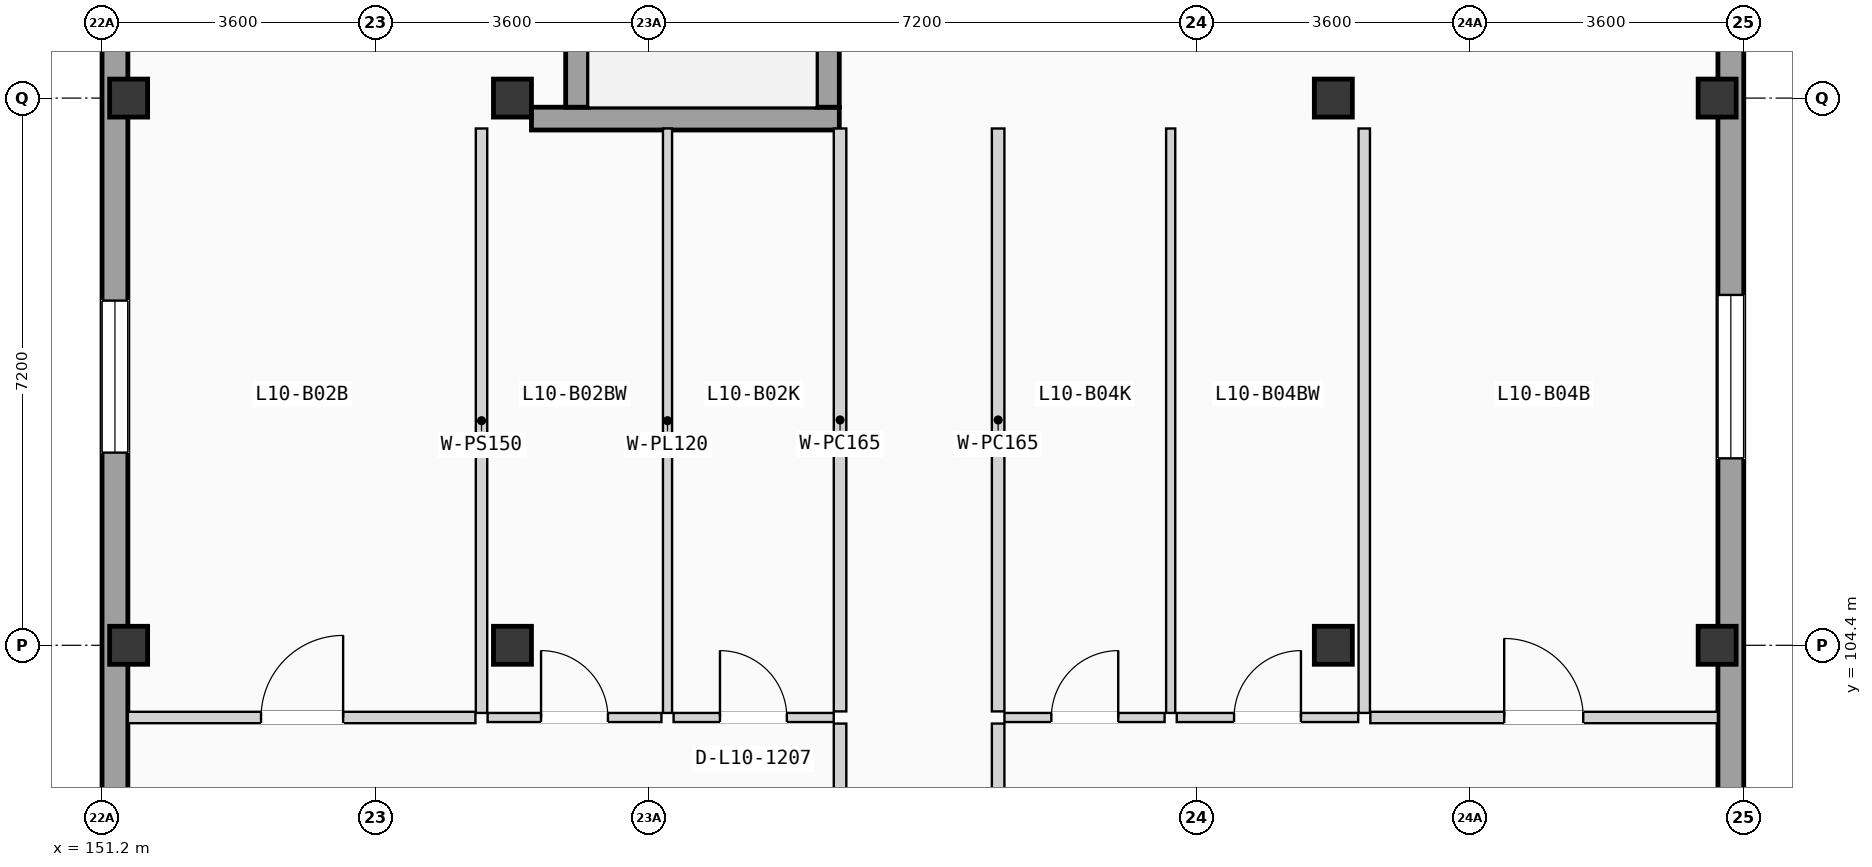
"""IFC4 building model, lengths in metres.
Left out: names, types, materials, properties, quantities, classifications, styles, units other than length and angle.
Written with IfcOpenShell. Run it as: python <this file> out.ifc"""

import sys

from ifc_helpers import new_model, si_unit, direction, frame, frame_2d, origin, origin_2d, place, context, subcontext, project, spatial, rectangle, extrude, element, fill, save


model = new_model("IFC4")
c1 = context("Model", 3, precision=1e-05, world=origin(), true_north=direction((0.0, 1.0)))
c2 = subcontext(c1, "Body", "Model", "MODEL_VIEW")
j1 = project(units=[si_unit("LENGTHUNIT", "METRE"), si_unit("PLANEANGLEUNIT", "RADIAN")], contexts=[c1])
p1 = place(None, origin())
s1 = spatial("IfcSite", under=j1, at=p1, CompositionType="ELEMENT")
p2 = place(p1, origin())
s2 = spatial("IfcBuilding", under=s1, at=p2, CompositionType="ELEMENT")
p3 = place(p2, frame((0.0, 0.0, 34.125)))
s3 = spatial("IfcBuildingStorey", under=s2, at=p3, CompositionType="ELEMENT", Elevation=34.125)
for number, where, z_axis, x_axis in (
    (1, (151.55, 104.4, 0.0), (0.0, 0.0, 1.0), (1.0, 0.0, 0.0)),
    (2, (151.55, 111.6, 0.0), (0.0, 0.0, 1.0), (1.0, 0.0, 0.0)),
    (3, (156.6, 104.4, 0.0), (0.0, 0.0, 1.0), (1.0, 0.0, 0.0)),
    (4, (156.6, 111.6, 0.0), (0.0, 0.0, 1.0), (1.0, 0.0, 0.0)),
    (5, (167.4, 104.4, 0.0), (0.0, 0.0, 1.0), (1.0, 0.0, 0.0)),
    (6, (167.4, 111.6, 0.0), (0.0, 0.0, 1.0), (1.0, 0.0, 0.0)),
    (7, (172.45, 104.4, 0.0), (0.0, 0.0, 1.0), (1.0, 0.0, 0.0)),
    (8, (172.45, 111.6, 0.0), (0.0, 0.0, 1.0), (1.0, 0.0, 0.0)),
):
    element("IfcColumn", number, at=place(p3, frame(where, z_axis=z_axis, x_axis=x_axis)), inside=s3, PredefinedType="COLUMN", context=c2, shape_type="SweptSolid", body=[
        extrude(rectangle(XDim=0.5, YDim=0.5, at=origin_2d()), origin(), (0.0, 0.0, 1.0), 3.15),
    ])
p4 = place(p3, frame((151.37, 68.74, 0.0), z_axis=(0.0, 0.0, 1.0), x_axis=(0.0, 1.0, 0.0)))
e9 = element("IfcWall", 9, at=p4, inside=s3, PredefinedType="SOLIDWALL", context=c2, shape_type="SweptSolid", body=[
    extrude(rectangle(XDim=49.72, YDim=0.34, at=frame_2d((24.86, 0.0))), origin(), (0.0, 0.0, 1.0), 2.89),
])
p5 = place(p4, frame((14.9, 0.0, 0.9)))
e10 = element("IfcOpeningElement", 10, at=p5, cuts=e9, PredefinedType="OPENING", context=c2, shape_type="SweptSolid", body=[
    extrude(rectangle(XDim=1.85, YDim=1.2, at=frame_2d((0.925, 0.6))), frame((0.0, 0.18, 0.0), z_axis=(0.0, -1.0, 0.0), x_axis=(1.0, 0.0, 0.0)), (0.0, 0.0, 1.0), 0.36),
])
p6 = place(p4, frame((8.573, 0.0, 0.855)))
e11 = element("IfcOpeningElement", 11, at=p6, cuts=e9, PredefinedType="OPENING", context=c2, shape_type="SweptSolid", body=[
    extrude(rectangle(XDim=1.85, YDim=1.35, at=frame_2d((0.925, 0.675))), frame((0.0, 0.18, 0.0), z_axis=(0.0, -1.0, 0.0), x_axis=(1.0, 0.0, 0.0)), (0.0, 0.0, 1.0), 0.36),
])
p7 = place(p4, frame((18.31, 0.0, 0.705)))
e12 = element("IfcOpeningElement", 12, at=p7, cuts=e9, PredefinedType="OPENING", context=c2, shape_type="SweptSolid", body=[
    extrude(rectangle(XDim=1.85, YDim=1.5, at=frame_2d((0.925, 0.75))), frame((0.0, 0.18, 0.0), z_axis=(0.0, -1.0, 0.0), x_axis=(1.0, 0.0, 0.0)), (0.0, 0.0, 1.0), 0.36),
])
p8 = place(p4, frame((31.135, 0.0, 0.555)))
e13 = element("IfcOpeningElement", 13, at=p8, cuts=e9, PredefinedType="OPENING", context=c2, shape_type="SweptSolid", body=[
    extrude(rectangle(XDim=1.85, YDim=1.65, at=frame_2d((0.925, 0.825))), frame((0.0, 0.18, 0.0), z_axis=(0.0, -1.0, 0.0), x_axis=(1.0, 0.0, 0.0)), (0.0, 0.0, 1.0), 0.36),
])
p9 = place(p4, frame((24.687, 0.0, 0.85)))
e14 = element("IfcOpeningElement", 14, at=p9, cuts=e9, PredefinedType="OPENING", context=c2, shape_type="SweptSolid", body=[
    extrude(rectangle(XDim=0.95, YDim=1.2, at=frame_2d((0.475, 0.6))), frame((0.0, 0.18, 0.0), z_axis=(0.0, -1.0, 0.0), x_axis=(1.0, 0.0, 0.0)), (0.0, 0.0, 1.0), 0.36),
])
p10 = place(p4, frame((38.195, 0.0, 0.9)))
e15 = element("IfcOpeningElement", 15, at=p10, cuts=e9, PredefinedType="OPENING", context=c2, shape_type="SweptSolid", body=[
    extrude(rectangle(XDim=2.0, YDim=1.2, at=frame_2d((1.0, 0.6))), frame((0.0, 0.18, 0.0), z_axis=(0.0, -1.0, 0.0), x_axis=(1.0, 0.0, 0.0)), (0.0, 0.0, 1.0), 0.36),
])
p11 = place(p3, frame((172.63, 68.74, 0.0), z_axis=(0.0, 0.0, 1.0), x_axis=(0.0, 1.0, 0.0)))
e16 = element("IfcWall", 16, at=p11, inside=s3, PredefinedType="SOLIDWALL", context=c2, shape_type="SweptSolid", body=[
    extrude(rectangle(XDim=49.72, YDim=0.34, at=frame_2d((24.86, 0.0))), origin(), (0.0, 0.0, 1.0), 2.89),
])
p12 = place(p11, frame((14.825, 0.0, 0.855)))
e17 = element("IfcOpeningElement", 17, at=p12, cuts=e16, PredefinedType="OPENING", context=c2, shape_type="SweptSolid", body=[
    extrude(rectangle(XDim=2.0, YDim=1.35, at=frame_2d((1.0, 0.675))), frame((0.0, 0.18, 0.0), z_axis=(0.0, -1.0, 0.0), x_axis=(1.0, 0.0, 0.0)), (0.0, 0.0, 1.0), 0.36),
])
p13 = place(p11, frame((8.498, 0.0, 0.705)))
e18 = element("IfcOpeningElement", 18, at=p13, cuts=e16, PredefinedType="OPENING", context=c2, shape_type="SweptSolid", body=[
    extrude(rectangle(XDim=2.0, YDim=1.5, at=frame_2d((1.0, 0.75))), frame((0.0, 0.18, 0.0), z_axis=(0.0, -1.0, 0.0), x_axis=(1.0, 0.0, 0.0)), (0.0, 0.0, 1.0), 0.36),
])
p14 = place(p11, frame((18.235, 0.0, 0.555)))
e19 = element("IfcOpeningElement", 19, at=p14, cuts=e16, PredefinedType="OPENING", context=c2, shape_type="SweptSolid", body=[
    extrude(rectangle(XDim=2.0, YDim=1.65, at=frame_2d((1.0, 0.825))), frame((0.0, 0.18, 0.0), z_axis=(0.0, -1.0, 0.0), x_axis=(1.0, 0.0, 0.0)), (0.0, 0.0, 1.0), 0.36),
])
p15 = place(p11, frame((31.585, 0.0, 0.85)))
e20 = element("IfcOpeningElement", 20, at=p15, cuts=e16, PredefinedType="OPENING", context=c2, shape_type="SweptSolid", body=[
    extrude(rectangle(XDim=0.95, YDim=1.2, at=frame_2d((0.475, 0.6))), frame((0.0, 0.18, 0.0), z_axis=(0.0, -1.0, 0.0), x_axis=(1.0, 0.0, 0.0)), (0.0, 0.0, 1.0), 0.36),
])
p16 = place(p11, frame((24.087, 0.0, 0.9)))
e21 = element("IfcOpeningElement", 21, at=p16, cuts=e16, PredefinedType="OPENING", context=c2, shape_type="SweptSolid", body=[
    extrude(rectangle(XDim=2.15, YDim=1.2, at=frame_2d((1.075, 0.6))), frame((0.0, 0.18, 0.0), z_axis=(0.0, -1.0, 0.0), x_axis=(1.0, 0.0, 0.0)), (0.0, 0.0, 1.0), 0.36),
])
p17 = place(p11, frame((38.12, 0.0, 0.855)))
e22 = element("IfcOpeningElement", 22, at=p17, cuts=e16, PredefinedType="OPENING", context=c2, shape_type="SweptSolid", body=[
    extrude(rectangle(XDim=2.15, YDim=1.35, at=frame_2d((1.075, 0.675))), frame((0.0, 0.18, 0.0), z_axis=(0.0, -1.0, 0.0), x_axis=(1.0, 0.0, 0.0)), (0.0, 0.0, 1.0), 0.36),
])
p18 = place(p3, frame((156.85, 111.33, 0.0), z_axis=(0.0, 0.0, 1.0), x_axis=(1.0, 0.0, 0.0)))
e23 = element("IfcWall", 23, at=p18, inside=s3, PredefinedType="SHEAR", context=c2, shape_type="SweptSolid", body=[
    extrude(rectangle(XDim=4.05, YDim=0.3, at=frame_2d((2.025, 0.0))), origin(), (0.0, 0.0, 1.0), 2.89),
])
p19 = place(p3, frame((157.45, 111.48, 0.0), z_axis=(0.0, 0.0, 1.0), x_axis=(0.0, 1.0, 0.0)))
e24 = element("IfcWall", 24, at=p19, inside=s3, PredefinedType="SHEAR", context=c2, shape_type="SweptSolid", body=[
    extrude(rectangle(XDim=7.0, YDim=0.3, at=frame_2d((3.5, 0.0))), origin(), (0.0, 0.0, 1.0), 2.89),
])
p20 = place(p3, frame((160.75, 111.48, 0.0), z_axis=(0.0, 0.0, 1.0), x_axis=(0.0, 1.0, 0.0)))
e25 = element("IfcWall", 25, at=p20, inside=s3, PredefinedType="SHEAR", context=c2, shape_type="SweptSolid", body=[
    extrude(rectangle(XDim=7.0, YDim=0.3, at=frame_2d((3.5, 0.0))), origin(), (0.0, 0.0, 1.0), 2.89),
])
p21 = place(p20, frame((5.625, 0.0, 0.0)))
e26 = element("IfcOpeningElement", 26, at=p21, cuts=e25, PredefinedType="OPENING", context=c2, shape_type="SweptSolid", body=[
    extrude(rectangle(XDim=1.15, YDim=2.12, at=frame_2d((0.575, 1.06))), frame((0.0, 0.16, 0.0), z_axis=(0.0, -1.0, 0.0), x_axis=(1.0, 0.0, 0.0)), (0.0, 0.0, 1.0), 0.32),
])
p22 = place(p3, frame((160.91, 98.23, 0.0), z_axis=(0.0, 0.0, 1.0), x_axis=(0.0, 1.0, 0.0)))
e27 = element("IfcWall", 27, at=p22, inside=s3, PredefinedType="PARTITIONING", context=c2, shape_type="SweptSolid", body=[
    extrude(rectangle(XDim=5.14, YDim=0.165, at=frame_2d((2.57, 0.0))), origin(), (0.0, 0.0, 1.0), 2.87),
])
p23 = place(p22, frame((2.065, 0.0, 0.0)))
e28 = element("IfcOpeningElement", 28, at=p23, cuts=e27, PredefinedType="OPENING", context=c2, shape_type="SweptSolid", body=[
    extrude(rectangle(XDim=1.01, YDim=2.11, at=frame_2d((0.505, 1.055))), frame((0.0, 0.093, 0.0), z_axis=(0.0, -1.0, 0.0), x_axis=(1.0, 0.0, 0.0)), (0.0, 0.0, 1.0), 0.185),
])
p24 = place(p3, frame((160.91, 103.53, 0.0), z_axis=(0.0, 0.0, 1.0), x_axis=(0.0, 1.0, 0.0)))
e29 = element("IfcWall", 29, at=p24, inside=s3, PredefinedType="PARTITIONING", context=c2, shape_type="SweptSolid", body=[
    extrude(rectangle(XDim=7.67, YDim=0.165, at=frame_2d((3.835, 0.0))), origin(), (0.0, 0.0, 1.0), 2.87),
])
p25 = place(p3, frame((162.99, 98.23, 0.0), z_axis=(0.0, 0.0, 1.0), x_axis=(0.0, 1.0, 0.0)))
e30 = element("IfcWall", 30, at=p25, inside=s3, PredefinedType="PARTITIONING", context=c2, shape_type="SweptSolid", body=[
    extrude(rectangle(XDim=5.14, YDim=0.165, at=frame_2d((2.57, 0.0))), origin(), (0.0, 0.0, 1.0), 2.87),
])
p26 = place(p25, frame((2.065, 0.0, 0.0)))
e31 = element("IfcOpeningElement", 31, at=p26, cuts=e30, PredefinedType="OPENING", context=c2, shape_type="SweptSolid", body=[
    extrude(rectangle(XDim=1.01, YDim=2.11, at=frame_2d((0.505, 1.055))), frame((0.0, 0.093, 0.0), z_axis=(0.0, -1.0, 0.0), x_axis=(1.0, 0.0, 0.0)), (0.0, 0.0, 1.0), 0.185),
])
p27 = place(p3, frame((162.99, 103.53, 0.0), z_axis=(0.0, 0.0, 1.0), x_axis=(0.0, 1.0, 0.0)))
e32 = element("IfcWall", 32, at=p27, inside=s3, PredefinedType="PARTITIONING", context=c2, shape_type="SweptSolid", body=[
    extrude(rectangle(XDim=7.67, YDim=0.165, at=frame_2d((3.835, 0.0))), origin(), (0.0, 0.0, 1.0), 2.87),
])
p28 = place(p3, frame((158.72, 103.45, 0.0), z_axis=(0.0, 0.0, 1.0), x_axis=(1.0, 0.0, 0.0)))
e33 = element("IfcWall", 33, at=p28, inside=s3, PredefinedType="PARTITIONING", context=c2, shape_type="SweptSolid", body=[
    extrude(rectangle(XDim=2.107, YDim=0.12, at=frame_2d((1.053, 0.0))), origin(), (0.0, 0.0, 1.0), 2.87),
])
p29 = place(p28, frame((0.61, 0.0, 0.0)))
e34 = element("IfcOpeningElement", 34, at=p29, cuts=e33, PredefinedType="OPENING", context=c2, shape_type="SweptSolid", body=[
    extrude(rectangle(XDim=0.88, YDim=2.02, at=frame_2d((0.44, 1.01))), frame((0.0, 0.07, 0.0), z_axis=(0.0, -1.0, 0.0), x_axis=(1.0, 0.0, 0.0)), (0.0, 0.0, 1.0), 0.14),
])
p30 = place(p3, frame((151.54, 103.45, 0.0), z_axis=(0.0, 0.0, 1.0), x_axis=(1.0, 0.0, 0.0)))
e35 = element("IfcWall", 35, at=p30, inside=s3, PredefinedType="PARTITIONING", context=c2, shape_type="SweptSolid", body=[
    extrude(rectangle(XDim=4.573, YDim=0.15, at=frame_2d((2.287, 0.0))), origin(), (0.0, 0.0, 1.0), 2.87),
])
p31 = place(p30, frame((1.752, 0.0, 0.0)))
e36 = element("IfcOpeningElement", 36, at=p31, cuts=e35, PredefinedType="OPENING", context=c2, shape_type="SweptSolid", body=[
    extrude(rectangle(XDim=1.08, YDim=2.1, at=frame_2d((0.54, 1.05))), frame((0.0, 0.085, 0.0), z_axis=(0.0, -1.0, 0.0), x_axis=(1.0, 0.0, 0.0)), (0.0, 0.0, 1.0), 0.17),
])
p32 = place(p3, frame((156.273, 103.45, 0.0), z_axis=(0.0, 0.0, 1.0), x_axis=(1.0, 0.0, 0.0)))
e37 = element("IfcWall", 37, at=p32, inside=s3, PredefinedType="PARTITIONING", context=c2, shape_type="SweptSolid", body=[
    extrude(rectangle(XDim=2.287, YDim=0.12, at=frame_2d((1.144, 0.0))), origin(), (0.0, 0.0, 1.0), 2.87),
])
p33 = place(p32, frame((0.703, 0.0, 0.0)))
e38 = element("IfcOpeningElement", 38, at=p33, cuts=e37, PredefinedType="OPENING", context=c2, shape_type="SweptSolid", body=[
    extrude(rectangle(XDim=0.88, YDim=2.02, at=frame_2d((0.44, 1.01))), frame((0.0, 0.07, 0.0), z_axis=(0.0, -1.0, 0.0), x_axis=(1.0, 0.0, 0.0)), (0.0, 0.0, 1.0), 0.14),
])
p34 = place(p3, frame((158.64, 103.51, 0.0), z_axis=(0.0, 0.0, 1.0), x_axis=(0.0, 1.0, 0.0)))
e39 = element("IfcWall", 39, at=p34, inside=s3, PredefinedType="PARTITIONING", context=c2, shape_type="SweptSolid", body=[
    extrude(rectangle(XDim=7.69, YDim=0.12, at=frame_2d((3.845, 0.0))), origin(), (0.0, 0.0, 1.0), 2.87),
])
p35 = place(p3, frame((156.193, 103.51, 0.0), z_axis=(0.0, 0.0, 1.0), x_axis=(0.0, 1.0, 0.0)))
e40 = element("IfcWall", 40, at=p35, inside=s3, PredefinedType="PARTITIONING", context=c2, shape_type="SweptSolid", body=[
    extrude(rectangle(XDim=7.69, YDim=0.15, at=frame_2d((3.845, 0.0))), origin(), (0.0, 0.0, 1.0), 2.87),
])
p36 = place(p3, frame((163.073, 103.45, 0.0), z_axis=(0.0, 0.0, 1.0), x_axis=(1.0, 0.0, 0.0)))
e41 = element("IfcWall", 41, at=p36, inside=s3, PredefinedType="PARTITIONING", context=c2, shape_type="SweptSolid", body=[
    extrude(rectangle(XDim=2.107, YDim=0.12, at=frame_2d((1.053, 0.0))), origin(), (0.0, 0.0, 1.0), 2.87),
])
p37 = place(p36, frame((0.617, 0.0, 0.0)))
e42 = element("IfcOpeningElement", 42, at=p37, cuts=e41, PredefinedType="OPENING", context=c2, shape_type="SweptSolid", body=[
    extrude(rectangle(XDim=0.88, YDim=2.02, at=frame_2d((0.44, 1.01))), frame((0.0, 0.07, 0.0), z_axis=(0.0, -1.0, 0.0), x_axis=(1.0, 0.0, 0.0)), (0.0, 0.0, 1.0), 0.14),
])
p38 = place(p3, frame((167.887, 103.45, 0.0), z_axis=(0.0, 0.0, 1.0), x_axis=(1.0, 0.0, 0.0)))
e43 = element("IfcWall", 43, at=p38, inside=s3, PredefinedType="PARTITIONING", context=c2, shape_type="SweptSolid", body=[
    extrude(rectangle(XDim=4.573, YDim=0.15, at=frame_2d((2.287, 0.0))), origin(), (0.0, 0.0, 1.0), 2.87),
])
p39 = place(p38, frame((1.761, 0.0, 0.0)))
e44 = element("IfcOpeningElement", 44, at=p39, cuts=e43, PredefinedType="OPENING", context=c2, shape_type="SweptSolid", body=[
    extrude(rectangle(XDim=1.04, YDim=2.08, at=frame_2d((0.52, 1.04))), frame((0.0, 0.085, 0.0), z_axis=(0.0, -1.0, 0.0), x_axis=(1.0, 0.0, 0.0)), (0.0, 0.0, 1.0), 0.17),
])
p40 = place(p3, frame((165.34, 103.45, 0.0), z_axis=(0.0, 0.0, 1.0), x_axis=(1.0, 0.0, 0.0)))
e45 = element("IfcWall", 45, at=p40, inside=s3, PredefinedType="PARTITIONING", context=c2, shape_type="SweptSolid", body=[
    extrude(rectangle(XDim=2.387, YDim=0.12, at=frame_2d((1.193, 0.0))), origin(), (0.0, 0.0, 1.0), 2.87),
])
p41 = place(p40, frame((0.754, 0.0, 0.0)))
e46 = element("IfcOpeningElement", 46, at=p41, cuts=e45, PredefinedType="OPENING", context=c2, shape_type="SweptSolid", body=[
    extrude(rectangle(XDim=0.88, YDim=2.02, at=frame_2d((0.44, 1.01))), frame((0.0, 0.07, 0.0), z_axis=(0.0, -1.0, 0.0), x_axis=(1.0, 0.0, 0.0)), (0.0, 0.0, 1.0), 0.14),
])
p42 = place(p3, frame((165.26, 103.51, 0.0), z_axis=(0.0, 0.0, 1.0), x_axis=(0.0, 1.0, 0.0)))
e47 = element("IfcWall", 47, at=p42, inside=s3, PredefinedType="PARTITIONING", context=c2, shape_type="SweptSolid", body=[
    extrude(rectangle(XDim=7.69, YDim=0.12, at=frame_2d((3.845, 0.0))), origin(), (0.0, 0.0, 1.0), 2.87),
])
p43 = place(p3, frame((167.807, 103.51, 0.0), z_axis=(0.0, 0.0, 1.0), x_axis=(0.0, 1.0, 0.0)))
e48 = element("IfcWall", 48, at=p43, inside=s3, PredefinedType="PARTITIONING", context=c2, shape_type="SweptSolid", body=[
    extrude(rectangle(XDim=7.69, YDim=0.15, at=frame_2d((3.845, 0.0))), origin(), (0.0, 0.0, 1.0), 2.87),
])
p44 = place(p10, origin())
e49 = element("IfcWindow", 49, at=p44, inside=s3, PartitioningType="DOUBLE_PANEL_VERTICAL", PredefinedType="WINDOW", context=c2, shape_type="SweptSolid", body=[
    extrude(rectangle(XDim=2.0, YDim=1.2, at=frame_2d((1.0, 0.6))), frame((0.0, 0.03, 0.0), z_axis=(0.0, -1.0, 0.0), x_axis=(1.0, 0.0, 0.0)), (0.0, 0.0, 1.0), 0.06),
])
fill(e15, e49)
p45 = place(p17, origin())
e50 = element("IfcWindow", 50, at=p45, inside=s3, PartitioningType="DOUBLE_PANEL_VERTICAL", PredefinedType="WINDOW", context=c2, shape_type="SweptSolid", body=[
    extrude(rectangle(XDim=2.15, YDim=1.35, at=frame_2d((1.075, 0.675))), frame((0.0, 0.03, 0.0), z_axis=(0.0, -1.0, 0.0), x_axis=(1.0, 0.0, 0.0)), (0.0, 0.0, 1.0), 0.06),
])
fill(e22, e50)
p46 = place(p29, origin())
e51 = element("IfcDoor", 51, at=p46, inside=s3, OperationType="SINGLE_SWING_LEFT", PredefinedType="DOOR", context=c2, shape_type="SweptSolid", body=[
    extrude(rectangle(XDim=0.88, YDim=2.02, at=frame_2d((0.44, 1.01))), frame((0.0, 0.025, 0.0), z_axis=(0.0, -1.0, 0.0), x_axis=(1.0, 0.0, 0.0)), (0.0, 0.0, 1.0), 0.05),
])
fill(e34, e51)
p47 = place(p31, origin())
e52 = element("IfcDoor", 52, at=p47, inside=s3, OperationType="SINGLE_SWING_RIGHT", PredefinedType="DOOR", context=c2, shape_type="SweptSolid", body=[
    extrude(rectangle(XDim=1.08, YDim=2.1, at=frame_2d((0.54, 1.05))), frame((0.0, 0.025, 0.0), z_axis=(0.0, -1.0, 0.0), x_axis=(1.0, 0.0, 0.0)), (0.0, 0.0, 1.0), 0.05),
])
fill(e36, e52)
p48 = place(p33, origin())
e53 = element("IfcDoor", 53, at=p48, inside=s3, OperationType="SINGLE_SWING_LEFT", PredefinedType="DOOR", context=c2, shape_type="SweptSolid", body=[
    extrude(rectangle(XDim=0.88, YDim=2.02, at=frame_2d((0.44, 1.01))), frame((0.0, 0.025, 0.0), z_axis=(0.0, -1.0, 0.0), x_axis=(1.0, 0.0, 0.0)), (0.0, 0.0, 1.0), 0.05),
])
fill(e38, e53)
p49 = place(p37, origin())
e54 = element("IfcDoor", 54, at=p49, inside=s3, OperationType="SINGLE_SWING_RIGHT", PredefinedType="DOOR", context=c2, shape_type="SweptSolid", body=[
    extrude(rectangle(XDim=0.88, YDim=2.02, at=frame_2d((0.44, 1.01))), frame((0.0, 0.025, 0.0), z_axis=(0.0, -1.0, 0.0), x_axis=(1.0, 0.0, 0.0)), (0.0, 0.0, 1.0), 0.05),
])
fill(e42, e54)
p50 = place(p39, origin())
e55 = element("IfcDoor", 55, at=p50, inside=s3, OperationType="SINGLE_SWING_LEFT", PredefinedType="DOOR", context=c2, shape_type="SweptSolid", body=[
    extrude(rectangle(XDim=1.04, YDim=2.08, at=frame_2d((0.52, 1.04))), frame((0.0, 0.025, 0.0), z_axis=(0.0, -1.0, 0.0), x_axis=(1.0, 0.0, 0.0)), (0.0, 0.0, 1.0), 0.05),
])
fill(e44, e55)
p51 = place(p41, origin())
e56 = element("IfcDoor", 56, at=p51, inside=s3, OperationType="SINGLE_SWING_RIGHT", PredefinedType="DOOR", context=c2, shape_type="SweptSolid", body=[
    extrude(rectangle(XDim=0.88, YDim=2.02, at=frame_2d((0.44, 1.01))), frame((0.0, 0.025, 0.0), z_axis=(0.0, -1.0, 0.0), x_axis=(1.0, 0.0, 0.0)), (0.0, 0.0, 1.0), 0.05),
])
fill(e46, e56)
save(model, sys.argv[1])
